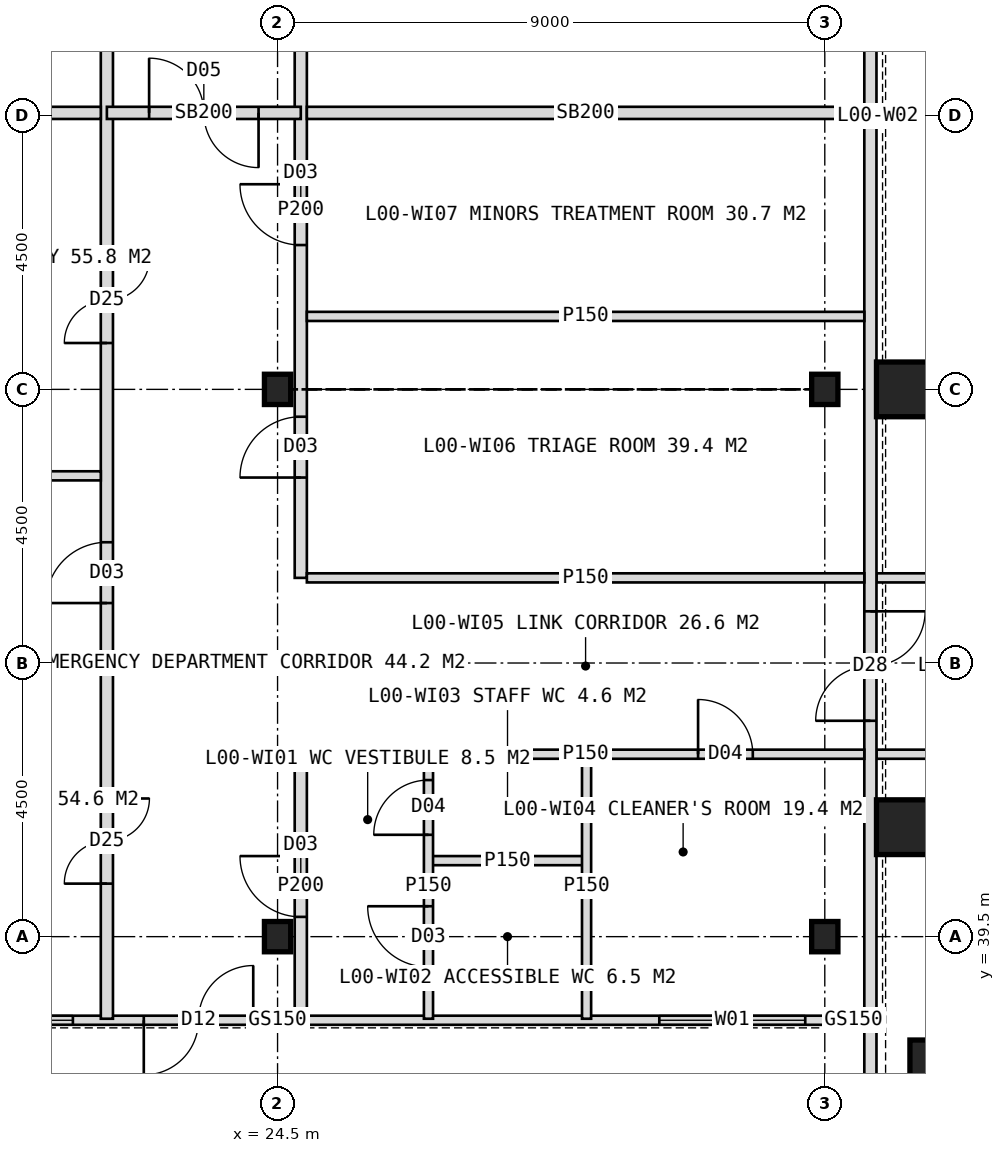
"""IFC4 building model, lengths in metres.
Left out: names, types, materials, properties, quantities, classifications, styles, units other than length and angle.
Written with IfcOpenShell. Run it as: python <this file> out.ifc"""

import sys

from ifc_helpers import new_model, si_unit, direction, frame, frame_2d, origin, origin_2d, place, context, subcontext, project, spatial, rectangle, hollow_rectangle, i_section, extrude, element, fill, save


model = new_model("IFC4")
c1 = context("Model", 3, precision=1e-05, world=origin(), true_north=direction((0.0, 1.0)))
c2 = subcontext(c1, "Body", "Model", "MODEL_VIEW")
j1 = project(units=[si_unit("LENGTHUNIT", "METRE"), si_unit("PLANEANGLEUNIT", "RADIAN")], contexts=[c1])
p1 = place(None, origin())
s1 = spatial("IfcSite", under=j1, at=p1, CompositionType="ELEMENT")
p2 = place(p1, origin())
s2 = spatial("IfcBuilding", under=s1, at=p2, CompositionType="ELEMENT")
p3 = place(p2, origin())
s3 = spatial("IfcBuildingStorey", under=s2, at=p3, CompositionType="ELEMENT", Elevation=0.0)
for number, where, z_axis, x_axis in (
    (1, (34.8, 41.3, 0.0), (0.0, 0.0, 1.0), (1.0, 0.0, 0.0)),
    (2, (34.8, 48.5, 0.0), (0.0, 0.0, 1.0), (1.0, 0.0, 0.0)),
    (3, (35.35, 37.35, 0.0), (0.0, 0.0, 1.0), (1.0, 0.0, 0.0)),
):
    element("IfcColumn", number, at=place(p3, frame(where, z_axis=z_axis, x_axis=x_axis)), inside=s3, PredefinedType="COLUMN", context=c2, shape_type="SweptSolid", body=[
        extrude(hollow_rectangle(XDim=0.9, YDim=0.9, WallThickness=0.08, at=origin_2d()), origin(), (0.0, 0.0, 1.0), 6.0),
    ])
for number, where, z_axis, x_axis in (
    (4, (24.5, 39.5, 0.0), (0.0, 0.0, 1.0), (1.0, 0.0, 0.0)),
    (5, (24.5, 48.5, 0.0), (0.0, 0.0, 1.0), (1.0, 0.0, 0.0)),
    (6, (33.5, 39.5, 0.0), (0.0, 0.0, 1.0), (1.0, 0.0, 0.0)),
    (7, (33.5, 48.5, 0.0), (0.0, 0.0, 1.0), (1.0, 0.0, 0.0)),
):
    element("IfcColumn", number, at=place(p3, frame(where, z_axis=z_axis, x_axis=x_axis)), inside=s3, PredefinedType="COLUMN", context=c2, shape_type="SweptSolid", body=[
        extrude(i_section(OverallWidth=0.432, OverallDepth=0.498, WebThickness=0.056, FlangeThickness=0.089, FilletRadius=0.015, at=origin_2d()), origin(), (0.0, 0.0, 1.0), 6.0),
    ])
p4 = place(p3, frame((15.5, 38.125, 0.0), z_axis=(0.0, 0.0, 1.0), x_axis=(1.0, 0.0, 0.0)))
e8 = element("IfcWall", 8, at=p4, inside=s3, PredefinedType="STANDARD", context=c2, shape_type="SweptSolid", body=[
    extrude(rectangle(XDim=18.0, YDim=0.15, at=frame_2d((9.0, 0.0))), origin(), (0.0, 0.0, 1.0), 5.1),
])
p5 = place(p4, frame((6.8, 0.0, 0.0)))
e9 = element("IfcOpeningElement", 9, at=p5, cuts=e8, PredefinedType="OPENING", context=c2, shape_type="SweptSolid", body=[
    extrude(rectangle(XDim=1.8, YDim=2.4, at=frame_2d((0.9, 1.2))), frame((0.0, 0.085, 0.0), z_axis=(0.0, -1.0, 0.0), x_axis=(1.0, 0.0, 0.0)), (0.0, 0.0, 1.0), 0.17),
])
p6 = place(p4, frame((0.234, 0.0, 0.6)))
e10 = element("IfcOpeningElement", 10, at=p6, cuts=e8, PredefinedType="OPENING", context=c2, shape_type="SweptSolid", body=[
    extrude(rectangle(XDim=2.4, YDim=3.0, at=frame_2d((1.2, 1.5))), frame((0.0, 0.085, 0.0), z_axis=(0.0, -1.0, 0.0), x_axis=(1.0, 0.0, 0.0)), (0.0, 0.0, 1.0), 0.17),
])
p7 = place(p4, frame((3.234, 0.0, 0.6)))
e11 = element("IfcOpeningElement", 11, at=p7, cuts=e8, PredefinedType="OPENING", context=c2, shape_type="SweptSolid", body=[
    extrude(rectangle(XDim=2.4, YDim=3.0, at=frame_2d((1.2, 1.5))), frame((0.0, 0.085, 0.0), z_axis=(0.0, -1.0, 0.0), x_axis=(1.0, 0.0, 0.0)), (0.0, 0.0, 1.0), 0.17),
])
p8 = place(p4, frame((15.279, 0.0, 0.6)))
e12 = element("IfcOpeningElement", 12, at=p8, cuts=e8, PredefinedType="OPENING", context=c2, shape_type="SweptSolid", body=[
    extrude(rectangle(XDim=2.4, YDim=3.0, at=frame_2d((1.2, 1.5))), frame((0.0, 0.085, 0.0), z_axis=(0.0, -1.0, 0.0), x_axis=(1.0, 0.0, 0.0)), (0.0, 0.0, 1.0), 0.17),
])
p9 = place(p3, frame((33.5, 38.125, 0.0), z_axis=(0.0, 0.0, 1.0), x_axis=(1.0, 0.0, 0.0)))
e13 = element("IfcWall", 13, at=p9, inside=s3, PredefinedType="STANDARD", context=c2, shape_type="SweptSolid", body=[
    extrude(rectangle(XDim=0.95, YDim=0.15, at=frame_2d((0.475, 0.0))), origin(), (0.0, 0.0, 1.0), 6.0),
])
for number, where, z_axis, x_axis in (
    (14, (40.5, 42.5, 0.0), (0.0, 0.0, 1.0), (-1.0, 0.0, 0.0)),
    (15, (40.5, 45.4, 0.0), (0.0, 0.0, 1.0), (-1.0, 0.0, 0.0)),
):
    element("IfcWall", number, at=place(p3, frame(where, z_axis=z_axis, x_axis=x_axis)), inside=s3, PredefinedType="PARTITIONING", context=c2, shape_type="SweptSolid", body=[
        extrude(rectangle(XDim=6.15, YDim=0.15, at=frame_2d((3.075, 0.0))), origin(), (0.0, 0.0, 1.0), 5.7),
    ])
p10 = place(p3, frame((21.693, 38.15, 0.0), z_axis=(0.0, 0.0, 1.0), x_axis=(0.0, 1.0, 0.0)))
e16 = element("IfcWall", 16, at=p10, inside=s3, PredefinedType="PARTITIONING", context=c2, shape_type="SweptSolid", body=[
    extrude(rectangle(XDim=47.7, YDim=0.2, at=frame_2d((23.85, 0.0))), origin(), (0.0, 0.0, 1.0), 5.7),
])
p11 = place(p10, frame((45.7, 0.0, 0.0)))
e17 = element("IfcOpeningElement", 17, at=p11, cuts=e16, PredefinedType="OPENING", context=c2, shape_type="SweptSolid", body=[
    extrude(rectangle(XDim=1.2, YDim=2.1, at=frame_2d((0.6, 1.05))), frame((0.0, 0.11, 0.0), z_axis=(0.0, -1.0, 0.0), x_axis=(1.0, 0.0, 0.0)), (0.0, 0.0, 1.0), 0.22),
])
p12 = place(p10, frame((36.244, 0.0, 0.0)))
e18 = element("IfcOpeningElement", 18, at=p12, cuts=e16, PredefinedType="OPENING", context=c2, shape_type="SweptSolid", body=[
    extrude(rectangle(XDim=1.0, YDim=2.1, at=frame_2d((0.5, 1.05))), frame((0.0, 0.11, 0.0), z_axis=(0.0, -1.0, 0.0), x_axis=(1.0, 0.0, 0.0)), (0.0, 0.0, 1.0), 0.22),
])
p13 = place(p10, frame((2.222, 0.0, 0.0)))
e19 = element("IfcOpeningElement", 19, at=p13, cuts=e16, PredefinedType="OPENING", context=c2, shape_type="SweptSolid", body=[
    extrude(rectangle(XDim=1.4, YDim=2.2, at=frame_2d((0.7, 1.1))), frame((0.0, 0.11, 0.0), z_axis=(0.0, -1.0, 0.0), x_axis=(1.0, 0.0, 0.0)), (0.0, 0.0, 1.0), 0.22),
])
p14 = place(p10, frame((6.836, 0.0, 0.0)))
e20 = element("IfcOpeningElement", 20, at=p14, cuts=e16, PredefinedType="OPENING", context=c2, shape_type="SweptSolid", body=[
    extrude(rectangle(XDim=1.0, YDim=2.1, at=frame_2d((0.5, 1.05))), frame((0.0, 0.11, 0.0), z_axis=(0.0, -1.0, 0.0), x_axis=(1.0, 0.0, 0.0)), (0.0, 0.0, 1.0), 0.22),
])
p15 = place(p10, frame((11.113, 0.0, 0.0)))
e21 = element("IfcOpeningElement", 21, at=p15, cuts=e16, PredefinedType="OPENING", context=c2, shape_type="SweptSolid", body=[
    extrude(rectangle(XDim=1.4, YDim=2.2, at=frame_2d((0.7, 1.1))), frame((0.0, 0.11, 0.0), z_axis=(0.0, -1.0, 0.0), x_axis=(1.0, 0.0, 0.0)), (0.0, 0.0, 1.0), 0.22),
])
p16 = place(p10, frame((17.081, 0.0, 0.0)))
e22 = element("IfcOpeningElement", 22, at=p16, cuts=e16, PredefinedType="OPENING", context=c2, shape_type="SweptSolid", body=[
    extrude(rectangle(XDim=1.4, YDim=2.2, at=frame_2d((0.7, 1.1))), frame((0.0, 0.11, 0.0), z_axis=(0.0, -1.0, 0.0), x_axis=(1.0, 0.0, 0.0)), (0.0, 0.0, 1.0), 0.22),
])
p17 = place(p10, frame((23.05, 0.0, 0.0)))
e23 = element("IfcOpeningElement", 23, at=p17, cuts=e16, PredefinedType="OPENING", context=c2, shape_type="SweptSolid", body=[
    extrude(rectangle(XDim=1.4, YDim=2.2, at=frame_2d((0.7, 1.1))), frame((0.0, 0.11, 0.0), z_axis=(0.0, -1.0, 0.0), x_axis=(1.0, 0.0, 0.0)), (0.0, 0.0, 1.0), 0.22),
])
p18 = place(p10, frame((27.527, 0.0, 0.0)))
e24 = element("IfcOpeningElement", 24, at=p18, cuts=e16, PredefinedType="OPENING", context=c2, shape_type="SweptSolid", body=[
    extrude(rectangle(XDim=1.4, YDim=2.2, at=frame_2d((0.7, 1.1))), frame((0.0, 0.11, 0.0), z_axis=(0.0, -1.0, 0.0), x_axis=(1.0, 0.0, 0.0)), (0.0, 0.0, 1.0), 0.22),
])
p19 = place(p10, frame((32.203, 0.0, 0.0)))
e25 = element("IfcOpeningElement", 25, at=p19, cuts=e16, PredefinedType="OPENING", context=c2, shape_type="SweptSolid", body=[
    extrude(rectangle(XDim=1.0, YDim=2.1, at=frame_2d((0.5, 1.05))), frame((0.0, 0.11, 0.0), z_axis=(0.0, -1.0, 0.0), x_axis=(1.0, 0.0, 0.0)), (0.0, 0.0, 1.0), 0.22),
])
p20 = place(p3, frame((24.882, 38.15, 0.0), z_axis=(0.0, 0.0, 1.0), x_axis=(0.0, 1.0, 0.0)))
e26 = element("IfcWall", 26, at=p20, inside=s3, PredefinedType="PARTITIONING", context=c2, shape_type="SweptSolid", body=[
    extrude(rectangle(XDim=4.35, YDim=0.2, at=frame_2d((2.175, 0.0))), origin(), (0.0, 0.0, 1.0), 5.7),
])
p21 = place(p20, frame((1.675, 0.0, 0.0)))
e27 = element("IfcOpeningElement", 27, at=p21, cuts=e26, PredefinedType="OPENING", context=c2, shape_type="SweptSolid", body=[
    extrude(rectangle(XDim=1.0, YDim=2.1, at=frame_2d((0.5, 1.05))), frame((0.0, 0.11, 0.0), z_axis=(0.0, -1.0, 0.0), x_axis=(1.0, 0.0, 0.0)), (0.0, 0.0, 1.0), 0.22),
])
p22 = place(p3, frame((24.882, 45.4, 0.0), z_axis=(0.0, 0.0, 1.0), x_axis=(0.0, 1.0, 0.0)))
e28 = element("IfcWall", 28, at=p22, inside=s3, PredefinedType="PARTITIONING", context=c2, shape_type="SweptSolid", body=[
    extrude(rectangle(XDim=12.1, YDim=0.2, at=frame_2d((6.05, 0.0))), origin(), (0.0, 0.0, 1.0), 5.7),
])
p23 = place(p22, frame((1.65, 0.0, 0.0)))
e29 = element("IfcOpeningElement", 29, at=p23, cuts=e28, PredefinedType="OPENING", context=c2, shape_type="SweptSolid", body=[
    extrude(rectangle(XDim=1.0, YDim=2.1, at=frame_2d((0.5, 1.05))), frame((0.0, 0.11, 0.0), z_axis=(0.0, -1.0, 0.0), x_axis=(1.0, 0.0, 0.0)), (0.0, 0.0, 1.0), 0.22),
])
p24 = place(p22, frame((5.473, 0.0, 0.0)))
e30 = element("IfcOpeningElement", 30, at=p24, cuts=e28, PredefinedType="OPENING", context=c2, shape_type="SweptSolid", body=[
    extrude(rectangle(XDim=1.0, YDim=2.1, at=frame_2d((0.5, 1.05))), frame((0.0, 0.11, 0.0), z_axis=(0.0, -1.0, 0.0), x_axis=(1.0, 0.0, 0.0)), (0.0, 0.0, 1.0), 0.22),
])
p25 = place(p22, frame((9.174, 0.0, 0.0)))
e31 = element("IfcOpeningElement", 31, at=p25, cuts=e28, PredefinedType="OPENING", context=c2, shape_type="SweptSolid", body=[
    extrude(rectangle(XDim=1.4, YDim=2.2, at=frame_2d((0.7, 1.1))), frame((0.0, 0.11, 0.0), z_axis=(0.0, -1.0, 0.0), x_axis=(1.0, 0.0, 0.0)), (0.0, 0.0, 1.0), 0.22),
])
p26 = place(p3, frame((21.693, 53.047, 0.0), z_axis=(0.0, 0.0, 1.0), x_axis=(1.0, 0.0, 0.0)))
e32 = element("IfcWall", 32, at=p26, inside=s3, PredefinedType="SOLIDWALL", context=c2, shape_type="SweptSolid", body=[
    extrude(rectangle(XDim=3.189, YDim=0.2, at=frame_2d((1.594, 0.0))), origin(), (0.0, 0.0, 1.0), 5.7),
])
p27 = place(p26, frame((0.695, 0.0, 0.0)))
e33 = element("IfcOpeningElement", 33, at=p27, cuts=e32, PredefinedType="OPENING", context=c2, shape_type="SweptSolid", body=[
    extrude(rectangle(XDim=1.8, YDim=2.2, at=frame_2d((0.9, 1.1))), frame((0.0, 0.11, 0.0), z_axis=(0.0, -1.0, 0.0), x_axis=(1.0, 0.0, 0.0)), (0.0, 0.0, 1.0), 0.22),
])
p28 = place(p3, frame((34.25, 36.8, 0.0), z_axis=(0.0, 0.0, 1.0), x_axis=(0.0, 1.0, 0.0)))
e34 = element("IfcWall", 34, at=p28, inside=s3, PredefinedType="SOLIDWALL", context=c2, shape_type="SweptSolid", body=[
    extrude(rectangle(XDim=50.4, YDim=0.2, at=frame_2d((25.2, 0.0))), origin(), (0.0, 0.0, 1.0), 5.7),
])
p29 = place(p28, frame((6.25, 0.0, 0.0)))
e35 = element("IfcOpeningElement", 35, at=p29, cuts=e34, PredefinedType="OPENING", context=c2, shape_type="SweptSolid", body=[
    extrude(rectangle(XDim=1.8, YDim=2.2, at=frame_2d((0.9, 1.1))), frame((0.0, 0.11, 0.0), z_axis=(0.0, -1.0, 0.0), x_axis=(1.0, 0.0, 0.0)), (0.0, 0.0, 1.0), 0.22),
])
p30 = place(p28, frame((25.55, 0.0, 0.0)))
e36 = element("IfcOpeningElement", 36, at=p30, cuts=e34, PredefinedType="OPENING", context=c2, shape_type="SweptSolid", body=[
    extrude(rectangle(XDim=1.8, YDim=2.2, at=frame_2d((0.9, 1.1))), frame((0.0, 0.11, 0.0), z_axis=(0.0, -1.0, 0.0), x_axis=(1.0, 0.0, 0.0)), (0.0, 0.0, 1.0), 0.22),
])
for number, where, z_axis, x_axis in (
    (37, (12.15, 44.094, 0.0), (0.0, 0.0, 1.0), (1.0, 0.0, 0.0)),
    (38, (12.15, 47.078, 0.0), (0.0, 0.0, 1.0), (1.0, 0.0, 0.0)),
):
    element("IfcWall", number, at=place(p3, frame(where, z_axis=z_axis, x_axis=x_axis)), inside=s3, PredefinedType="PARTITIONING", context=c2, shape_type="SweptSolid", body=[
        extrude(rectangle(XDim=9.443, YDim=0.15, at=frame_2d((4.722, 0.0))), origin(), (0.0, 0.0, 1.0), 5.7),
    ])
p31 = place(p3, frame((12.15, 53.047, 0.0), z_axis=(0.0, 0.0, 1.0), x_axis=(1.0, 0.0, 0.0)))
e39 = element("IfcWall", 39, at=p31, inside=s3, PredefinedType="SOLIDWALL", context=c2, shape_type="SweptSolid", body=[
    extrude(rectangle(XDim=9.443, YDim=0.2, at=frame_2d((4.722, 0.0))), origin(), (0.0, 0.0, 1.0), 5.7),
])
p32 = place(p3, frame((26.982, 40.75, 0.0), z_axis=(0.0, 0.0, 1.0), x_axis=(1.0, 0.0, 0.0)))
e40 = element("IfcWall", 40, at=p32, inside=s3, PredefinedType="PARTITIONING", context=c2, shape_type="SweptSolid", body=[
    extrude(rectangle(XDim=2.6, YDim=0.15, at=frame_2d((1.3, 0.0))), origin(), (0.0, 0.0, 1.0), 5.7),
])
p33 = place(p3, frame((24.982, 42.5, 0.0), z_axis=(0.0, 0.0, 1.0), x_axis=(1.0, 0.0, 0.0)))
e41 = element("IfcWall", 41, at=p33, inside=s3, PredefinedType="PARTITIONING", context=c2, shape_type="SweptSolid", body=[
    extrude(rectangle(XDim=9.168, YDim=0.15, at=frame_2d((4.584, 0.0))), origin(), (0.0, 0.0, 1.0), 5.7),
])
p34 = place(p33, frame((6.434, 0.0, 0.0)))
e42 = element("IfcOpeningElement", 42, at=p34, cuts=e41, PredefinedType="OPENING", context=c2, shape_type="SweptSolid", body=[
    extrude(rectangle(XDim=0.9, YDim=2.1, at=frame_2d((0.45, 1.05))), frame((0.0, 0.085, 0.0), z_axis=(0.0, -1.0, 0.0), x_axis=(1.0, 0.0, 0.0)), (0.0, 0.0, 1.0), 0.17),
])
for number, where, z_axis, x_axis in (
    (43, (24.982, 45.4, 0.0), (0.0, 0.0, 1.0), (1.0, 0.0, 0.0)),
    (44, (24.982, 49.7, 0.0), (0.0, 0.0, 1.0), (1.0, 0.0, 0.0)),
):
    element("IfcWall", number, at=place(p3, frame(where, z_axis=z_axis, x_axis=x_axis)), inside=s3, PredefinedType="PARTITIONING", context=c2, shape_type="SweptSolid", body=[
        extrude(rectangle(XDim=9.168, YDim=0.15, at=frame_2d((4.584, 0.0))), origin(), (0.0, 0.0, 1.0), 5.7),
    ])
p35 = place(p3, frame((24.982, 53.047, 0.0), z_axis=(0.0, 0.0, 1.0), x_axis=(1.0, 0.0, 0.0)))
e45 = element("IfcWall", 45, at=p35, inside=s3, PredefinedType="SOLIDWALL", context=c2, shape_type="SweptSolid", body=[
    extrude(rectangle(XDim=9.168, YDim=0.2, at=frame_2d((4.584, 0.0))), origin(), (0.0, 0.0, 1.0), 5.7),
])
p36 = place(p3, frame((26.982, 38.15, 0.0), z_axis=(0.0, 0.0, 1.0), x_axis=(0.0, 1.0, 0.0)))
e46 = element("IfcWall", 46, at=p36, inside=s3, PredefinedType="PARTITIONING", context=c2, shape_type="SweptSolid", body=[
    extrude(rectangle(XDim=4.35, YDim=0.15, at=frame_2d((2.175, 0.0))), origin(), (0.0, 0.0, 1.0), 5.7),
])
p37 = place(p36, frame((0.85, 0.0, 0.0)))
e47 = element("IfcOpeningElement", 47, at=p37, cuts=e46, PredefinedType="OPENING", context=c2, shape_type="SweptSolid", body=[
    extrude(rectangle(XDim=1.0, YDim=2.1, at=frame_2d((0.5, 1.05))), frame((0.0, 0.085, 0.0), z_axis=(0.0, -1.0, 0.0), x_axis=(1.0, 0.0, 0.0)), (0.0, 0.0, 1.0), 0.17),
])
p38 = place(p36, frame((3.025, 0.0, 0.0)))
e48 = element("IfcOpeningElement", 48, at=p38, cuts=e46, PredefinedType="OPENING", context=c2, shape_type="SweptSolid", body=[
    extrude(rectangle(XDim=0.9, YDim=2.1, at=frame_2d((0.45, 1.05))), frame((0.0, 0.085, 0.0), z_axis=(0.0, -1.0, 0.0), x_axis=(1.0, 0.0, 0.0)), (0.0, 0.0, 1.0), 0.17),
])
p39 = place(p3, frame((29.582, 38.15, 0.0), z_axis=(0.0, 0.0, 1.0), x_axis=(0.0, 1.0, 0.0)))
e49 = element("IfcWall", 49, at=p39, inside=s3, PredefinedType="PARTITIONING", context=c2, shape_type="SweptSolid", body=[
    extrude(rectangle(XDim=4.35, YDim=0.15, at=frame_2d((2.175, 0.0))), origin(), (0.0, 0.0, 1.0), 5.7),
])
p40 = place(p5, frame((1.8, 0.0, 0.0), z_axis=(0.0, 0.0, 1.0), x_axis=(-1.0, 0.0, 0.0)))
e50 = element("IfcDoor", 50, at=p40, inside=s3, OperationType="DOUBLE_DOOR_SINGLE_SWING", PredefinedType="DOOR", context=c2, shape_type="SweptSolid", body=[
    extrude(rectangle(XDim=1.8, YDim=2.4, at=frame_2d((0.9, 1.2))), frame((0.0, 0.025, 0.0), z_axis=(0.0, -1.0, 0.0), x_axis=(1.0, 0.0, 0.0)), (0.0, 0.0, 1.0), 0.05),
])
fill(e9, e50)
p41 = place(p7, origin())
e51 = element("IfcWindow", 51, at=p41, inside=s3, PartitioningType="SINGLE_PANEL", PredefinedType="WINDOW", context=c2, shape_type="SweptSolid", body=[
    extrude(rectangle(XDim=2.4, YDim=3.0, at=frame_2d((1.2, 1.5))), frame((0.0, 0.03, 0.0), z_axis=(0.0, -1.0, 0.0), x_axis=(1.0, 0.0, 0.0)), (0.0, 0.0, 1.0), 0.06),
])
fill(e11, e51)
p42 = place(p8, origin())
e52 = element("IfcWindow", 52, at=p42, inside=s3, PartitioningType="SINGLE_PANEL", PredefinedType="WINDOW", context=c2, shape_type="SweptSolid", body=[
    extrude(rectangle(XDim=2.4, YDim=3.0, at=frame_2d((1.2, 1.5))), frame((0.0, 0.03, 0.0), z_axis=(0.0, -1.0, 0.0), x_axis=(1.0, 0.0, 0.0)), (0.0, 0.0, 1.0), 0.06),
])
fill(e12, e52)
p43 = place(p27, origin())
e53 = element("IfcDoor", 53, at=p43, inside=s3, OperationType="DOUBLE_DOOR_DOUBLE_SWING", PredefinedType="DOOR", context=c2, shape_type="SweptSolid", body=[
    extrude(rectangle(XDim=1.8, YDim=2.2, at=frame_2d((0.9, 1.1))), frame((0.0, 0.025, 0.0), z_axis=(0.0, -1.0, 0.0), x_axis=(1.0, 0.0, 0.0)), (0.0, 0.0, 1.0), 0.05),
])
fill(e33, e53)
p44 = place(p29, origin())
e54 = element("IfcDoor", 54, at=p44, inside=s3, OperationType="DOUBLE_DOOR_SINGLE_SWING", PredefinedType="DOOR", context=c2, shape_type="SweptSolid", body=[
    extrude(rectangle(XDim=1.8, YDim=2.2, at=frame_2d((0.9, 1.1))), frame((0.0, 0.025, 0.0), z_axis=(0.0, -1.0, 0.0), x_axis=(1.0, 0.0, 0.0)), (0.0, 0.0, 1.0), 0.05),
])
fill(e35, e54)
p45 = place(p13, origin())
e55 = element("IfcDoor", 55, at=p45, inside=s3, OperationType="DOUBLE_DOOR_SINGLE_SWING", PredefinedType="DOOR", context=c2, shape_type="SweptSolid", body=[
    extrude(rectangle(XDim=1.4, YDim=2.2, at=frame_2d((0.7, 1.1))), frame((0.0, 0.025, 0.0), z_axis=(0.0, -1.0, 0.0), x_axis=(1.0, 0.0, 0.0)), (0.0, 0.0, 1.0), 0.05),
])
fill(e19, e55)
p46 = place(p14, origin())
e56 = element("IfcDoor", 56, at=p46, inside=s3, OperationType="SINGLE_SWING_LEFT", PredefinedType="DOOR", context=c2, shape_type="SweptSolid", body=[
    extrude(rectangle(XDim=1.0, YDim=2.1, at=frame_2d((0.5, 1.05))), frame((0.0, 0.025, 0.0), z_axis=(0.0, -1.0, 0.0), x_axis=(1.0, 0.0, 0.0)), (0.0, 0.0, 1.0), 0.05),
])
fill(e20, e56)
p47 = place(p15, origin())
e57 = element("IfcDoor", 57, at=p47, inside=s3, OperationType="DOUBLE_DOOR_SINGLE_SWING", PredefinedType="DOOR", context=c2, shape_type="SweptSolid", body=[
    extrude(rectangle(XDim=1.4, YDim=2.2, at=frame_2d((0.7, 1.1))), frame((0.0, 0.025, 0.0), z_axis=(0.0, -1.0, 0.0), x_axis=(1.0, 0.0, 0.0)), (0.0, 0.0, 1.0), 0.05),
])
fill(e21, e57)
p48 = place(p21, origin())
e58 = element("IfcDoor", 58, at=p48, inside=s3, OperationType="SINGLE_SWING_RIGHT", PredefinedType="DOOR", context=c2, shape_type="SweptSolid", body=[
    extrude(rectangle(XDim=1.0, YDim=2.1, at=frame_2d((0.5, 1.05))), frame((0.0, 0.025, 0.0), z_axis=(0.0, -1.0, 0.0), x_axis=(1.0, 0.0, 0.0)), (0.0, 0.0, 1.0), 0.05),
])
fill(e27, e58)
p49 = place(p37, origin())
e59 = element("IfcDoor", 59, at=p49, inside=s3, OperationType="SINGLE_SWING_RIGHT", PredefinedType="DOOR", context=c2, shape_type="SweptSolid", body=[
    extrude(rectangle(XDim=1.0, YDim=2.1, at=frame_2d((0.5, 1.05))), frame((0.0, 0.025, 0.0), z_axis=(0.0, -1.0, 0.0), x_axis=(1.0, 0.0, 0.0)), (0.0, 0.0, 1.0), 0.05),
])
fill(e47, e59)
p50 = place(p38, origin())
e60 = element("IfcDoor", 60, at=p50, inside=s3, OperationType="SINGLE_SWING_LEFT", PredefinedType="DOOR", context=c2, shape_type="SweptSolid", body=[
    extrude(rectangle(XDim=0.9, YDim=2.1, at=frame_2d((0.45, 1.05))), frame((0.0, 0.025, 0.0), z_axis=(0.0, -1.0, 0.0), x_axis=(1.0, 0.0, 0.0)), (0.0, 0.0, 1.0), 0.05),
])
fill(e48, e60)
p51 = place(p34, origin())
e61 = element("IfcDoor", 61, at=p51, inside=s3, OperationType="SINGLE_SWING_LEFT", PredefinedType="DOOR", context=c2, shape_type="SweptSolid", body=[
    extrude(rectangle(XDim=0.9, YDim=2.1, at=frame_2d((0.45, 1.05))), frame((0.0, 0.025, 0.0), z_axis=(0.0, -1.0, 0.0), x_axis=(1.0, 0.0, 0.0)), (0.0, 0.0, 1.0), 0.05),
])
fill(e42, e61)
p52 = place(p23, origin())
e62 = element("IfcDoor", 62, at=p52, inside=s3, OperationType="SINGLE_SWING_LEFT", PredefinedType="DOOR", context=c2, shape_type="SweptSolid", body=[
    extrude(rectangle(XDim=1.0, YDim=2.1, at=frame_2d((0.5, 1.05))), frame((0.0, 0.025, 0.0), z_axis=(0.0, -1.0, 0.0), x_axis=(1.0, 0.0, 0.0)), (0.0, 0.0, 1.0), 0.05),
])
fill(e29, e62)
p53 = place(p24, origin())
e63 = element("IfcDoor", 63, at=p53, inside=s3, OperationType="SINGLE_SWING_RIGHT", PredefinedType="DOOR", context=c2, shape_type="SweptSolid", body=[
    extrude(rectangle(XDim=1.0, YDim=2.1, at=frame_2d((0.5, 1.05))), frame((0.0, 0.025, 0.0), z_axis=(0.0, -1.0, 0.0), x_axis=(1.0, 0.0, 0.0)), (0.0, 0.0, 1.0), 0.05),
])
fill(e30, e63)
save(model, sys.argv[1])
